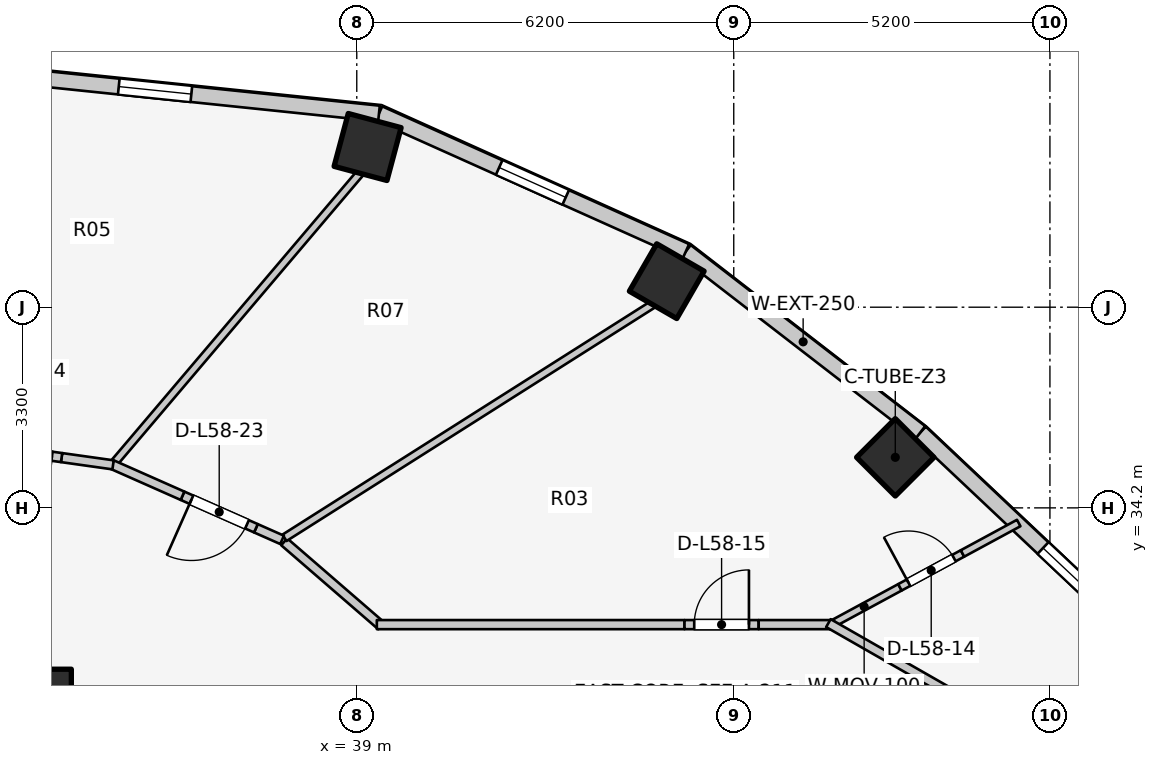
"""IFC4 building model, lengths in metres.
Left out: names, types, materials, properties, quantities, classifications, styles, units other than length and angle.
Written with IfcOpenShell. Run it as: python <this file> out.ifc"""

import sys

from ifc_helpers import new_model, si_unit, direction, frame, frame_2d, origin, origin_2d, place, context, subcontext, project, spatial, rectangle, extrude, element, fill, save


model = new_model("IFC4")
c1 = context("Model", 3, precision=1e-05, world=origin(), true_north=direction((0.0, 1.0)))
c2 = subcontext(c1, "Body", "Model", "MODEL_VIEW")
j1 = project(units=[si_unit("LENGTHUNIT", "METRE"), si_unit("PLANEANGLEUNIT", "RADIAN")], contexts=[c1])
p1 = place(None, origin())
s1 = spatial("IfcSite", under=j1, at=p1, CompositionType="ELEMENT")
p2 = place(p1, origin())
s2 = spatial("IfcBuilding", under=s1, at=p2, CompositionType="ELEMENT")
p3 = place(p2, frame((0.0, 0.0, 190.1)))
s3 = spatial("IfcBuildingStorey", under=s2, at=p3, CompositionType="ELEMENT", Elevation=190.1)
for number, where, z_axis, x_axis in (
    (1, (47.857, 35.031, 0.0), (0.0, 0.0, 1.0), (0.707, 0.707, 0.0)),
    (2, (44.098, 37.928, 0.0), (0.0, 0.0, 1.0), (0.5, 0.866, 0.0)),
):
    element("IfcColumn", number, at=place(p3, frame(where, z_axis=z_axis, x_axis=x_axis)), inside=s3, PredefinedType="COLUMN", context=c2, shape_type="SweptSolid", body=[
        extrude(rectangle(XDim=0.9, YDim=0.9, at=origin_2d()), origin(), (0.0, 0.0, 1.0), 3.1),
    ])
p4 = place(p3, frame((33.931, 31.172, 0.0), z_axis=(0.0, 0.0, 1.0), x_axis=(1.0, 0.0, 0.0)))
e3 = element("IfcColumn", 3, at=p4, inside=s3, PredefinedType="COLUMN", context=c2, shape_type="SweptSolid", body=[
    extrude(rectangle(XDim=0.75, YDim=0.75, at=origin_2d()), origin(), (0.0, 0.0, 1.0), 3.1),
])
p5 = place(p3, frame((39.178, 40.135, 0.0), z_axis=(0.0, 0.0, 1.0), x_axis=(0.258819045103, 0.965925826289, 0.0)))
e4 = element("IfcColumn", 4, at=p5, inside=s3, PredefinedType="COLUMN", context=c2, shape_type="SweptSolid", body=[
    extrude(rectangle(XDim=0.9, YDim=0.9, at=origin_2d()), origin(), (0.0, 0.0, 1.0), 3.1),
])
p6 = place(p3, frame((51.619, 32.284, 0.0), z_axis=(0.0, 0.0, 1.0), x_axis=(-0.727667301037, 0.68593024354, 0.0)))
e5 = element("IfcWall", 5, at=p6, inside=s3, PredefinedType="STANDARD", context=c2, shape_type="SweptSolid", body=[
    extrude(rectangle(XDim=4.604, YDim=0.26, at=frame_2d((2.302, 0.0))), origin(), (0.0, 0.0, 1.0), 1.22),
])
p7 = place(p6, frame((0.631, 0.0, 0.15)))
e6 = element("IfcOpeningElement", 6, at=p7, cuts=e5, PredefinedType="OPENING", context=c2, shape_type="SweptSolid", body=[
    extrude(rectangle(XDim=1.2, YDim=0.9, at=frame_2d((0.6, 0.45))), frame((0.0, 0.14, 0.0), z_axis=(0.0, -1.0, 0.0), x_axis=(1.0, 0.0, 0.0)), (0.0, 0.0, 1.0), 0.28),
])
p8 = place(p3, frame((48.269, 35.441, 0.0), z_axis=(0.0, 0.0, 1.0), x_axis=(-0.791460185804, 0.611220724687, 0.0)))
e7 = element("IfcWall", 7, at=p8, inside=s3, PredefinedType="STANDARD", context=c2, shape_type="SweptSolid", body=[
    extrude(rectangle(XDim=4.872, YDim=0.26, at=frame_2d((2.436, 0.0))), origin(), (0.0, 0.0, 1.0), 1.22),
])
p9 = place(p3, frame((44.413, 38.419, 0.0), z_axis=(0.0, 0.0, 1.0), x_axis=(-0.912353637112, 0.409403029847, 0.0)))
e8 = element("IfcWall", 8, at=p9, inside=s3, PredefinedType="STANDARD", context=c2, shape_type="SweptSolid", body=[
    extrude(rectangle(XDim=5.533, YDim=0.26, at=frame_2d((2.766, 0.0))), origin(), (0.0, 0.0, 1.0), 1.22),
])
p10 = place(p9, frame((2.167, 0.0, 0.15)))
e9 = element("IfcOpeningElement", 9, at=p10, cuts=e8, PredefinedType="OPENING", context=c2, shape_type="SweptSolid", body=[
    extrude(rectangle(XDim=1.2, YDim=0.9, at=frame_2d((0.6, 0.45))), frame((0.0, 0.14, 0.0), z_axis=(0.0, -1.0, 0.0), x_axis=(1.0, 0.0, 0.0)), (0.0, 0.0, 1.0), 0.28),
])
p11 = place(p3, frame((39.365, 40.685, 0.0), z_axis=(0.0, 0.0, 1.0), x_axis=(-0.994664178965, 0.10316574569, 0.0)))
e10 = element("IfcWall", 10, at=p11, inside=s3, PredefinedType="STANDARD", context=c2, shape_type="SweptSolid", body=[
    extrude(rectangle(XDim=7.405, YDim=0.26, at=frame_2d((3.702, 0.0))), origin(), (0.0, 0.0, 1.0), 1.22),
])
p12 = place(p11, frame((3.102, 0.0, 0.15)))
e11 = element("IfcOpeningElement", 11, at=p12, cuts=e10, PredefinedType="OPENING", context=c2, shape_type="SweptSolid", body=[
    extrude(rectangle(XDim=1.2, YDim=0.9, at=frame_2d((0.6, 0.45))), frame((0.0, 0.14, 0.0), z_axis=(0.0, -1.0, 0.0), x_axis=(1.0, 0.0, 0.0)), (0.0, 0.0, 1.0), 0.28),
])
p13 = place(p3, frame((46.756, 32.256, 0.0), z_axis=(0.0, 0.0, 1.0), x_axis=(0.879396983738, 0.476089219572, 0.0)))
e12 = element("IfcWall", 12, at=p13, inside=s3, PredefinedType="MOVABLE", context=c2, shape_type="SweptSolid", body=[
    extrude(rectangle(XDim=1.338, YDim=0.12, at=frame_2d((0.669, 0.0))), origin(), (0.0, 0.0, 1.0), 1.22),
])
p14 = place(p3, frame((47.933, 32.893, 0.0), z_axis=(0.0, 0.0, 1.0), x_axis=(0.879342939039, 0.476189033433, 0.0)))
e13 = element("IfcWall", 13, at=p14, inside=s3, PredefinedType="MOVABLE", context=c2, shape_type="SweptSolid", body=[
    extrude(rectangle(XDim=1.17, YDim=0.12, at=frame_2d((0.585, 0.0))), origin(), (0.0, 0.0, 1.0), 2.11),
])
p15 = place(p14, frame((0.16, 0.0, 0.0)))
e14 = element("IfcOpeningElement", 14, at=p15, cuts=e13, PredefinedType="OPENING", context=c2, shape_type="SweptSolid", body=[
    extrude(rectangle(XDim=0.85, YDim=2.05, at=frame_2d((0.425, 1.025))), frame((0.0, 0.07, 0.0), z_axis=(0.0, -1.0, 0.0), x_axis=(1.0, 0.0, 0.0)), (0.0, 0.0, 1.0), 0.14),
])
p16 = place(p3, frame((48.962, 33.45, 0.0), z_axis=(0.0, 0.0, 1.0), x_axis=(0.879417553007, 0.476051223571, 0.0)))
e15 = element("IfcWall", 15, at=p16, inside=s3, PredefinedType="MOVABLE", context=c2, shape_type="SweptSolid", body=[
    extrude(rectangle(XDim=1.051, YDim=0.12, at=frame_2d((0.526, 0.0))), origin(), (0.0, 0.0, 1.0), 2.575),
])
p17 = place(p3, frame((37.807, 33.642, 0.0), z_axis=(0.0, 0.0, 1.0), x_axis=(0.756055312247, -0.654507727092, 0.0)))
e16 = element("IfcWall", 16, at=p17, inside=s3, PredefinedType="PARTITIONING", context=c2, shape_type="SweptSolid", body=[
    extrude(rectangle(XDim=2.111, YDim=0.15, at=frame_2d((1.055, 0.0))), origin(), (0.0, 0.0, 1.0), 1.22),
])
p18 = place(p3, frame((39.33, 32.28, 0.0), z_axis=(0.0, 0.0, 1.0), x_axis=(1.0, 0.0, 0.0)))
e17 = element("IfcWall", 17, at=p18, inside=s3, PredefinedType="PARTITIONING", context=c2, shape_type="SweptSolid", body=[
    extrude(rectangle(XDim=5.06, YDim=0.15, at=frame_2d((2.53, 0.0))), origin(), (0.0, 0.0, 1.0), 1.22),
])
p19 = place(p3, frame((44.39, 32.28, 0.0), z_axis=(0.0, 0.0, 1.0), x_axis=(1.0, 0.0, 0.0)))
e18 = element("IfcWall", 18, at=p19, inside=s3, PredefinedType="PARTITIONING", context=c2, shape_type="SweptSolid", body=[
    extrude(rectangle(XDim=1.22, YDim=0.15, at=frame_2d((0.61, 0.0))), origin(), (0.0, 0.0, 1.0), 2.16),
])
p20 = place(p19, frame((0.16, 0.0, 0.0)))
e19 = element("IfcOpeningElement", 19, at=p20, cuts=e18, PredefinedType="OPENING", context=c2, shape_type="SweptSolid", body=[
    extrude(rectangle(XDim=0.9, YDim=2.1, at=frame_2d((0.45, 1.05))), frame((0.0, 0.085, 0.0), z_axis=(0.0, -1.0, 0.0), x_axis=(1.0, 0.0, 0.0)), (0.0, 0.0, 1.0), 0.17),
])
p21 = place(p3, frame((45.61, 32.28, 0.0), z_axis=(0.0, 0.0, 1.0), x_axis=(1.0, 0.0, 0.0)))
e20 = element("IfcWall", 20, at=p21, inside=s3, PredefinedType="PARTITIONING", context=c2, shape_type="SweptSolid", body=[
    extrude(rectangle(XDim=1.24, YDim=0.15, at=frame_2d((0.62, 0.0))), origin(), (0.0, 0.0, 1.0), 2.575),
])
p22 = place(p3, frame((46.757, 32.305, 0.0), z_axis=(0.0, 0.0, 1.0), x_axis=(0.867991349648, -0.496579315857, 0.0)))
e21 = element("IfcWall", 21, at=p22, inside=s3, PredefinedType="PARTITIONING", context=c2, shape_type="SweptSolid", body=[
    extrude(rectangle(XDim=2.567, YDim=0.15, at=frame_2d((1.283, 0.0))), origin(), (0.0, 0.0, 1.0), 1.22),
])
p23 = place(p3, frame((37.812, 33.708, 0.0), z_axis=(0.0, 0.0, 1.0), x_axis=(0.844640430122, 0.535334048799, 0.0)))
e22 = element("IfcWall", 22, at=p23, inside=s3, PredefinedType="PARTITIONING", context=c2, shape_type="SweptSolid", body=[
    extrude(rectangle(XDim=7.188, YDim=0.125, at=frame_2d((3.594, 0.0))), origin(), (0.0, 0.0, 1.0), 1.22),
])
p24 = place(p3, frame((35.02, 34.952, 0.0), z_axis=(0.0, 0.0, 1.0), x_axis=(0.647173462792, 0.762342776615, 0.0)))
e23 = element("IfcWall", 23, at=p24, inside=s3, PredefinedType="PARTITIONING", context=c2, shape_type="SweptSolid", body=[
    extrude(rectangle(XDim=6.253, YDim=0.125, at=frame_2d((3.127, 0.0))), origin(), (0.0, 0.0, 1.0), 1.22),
])
p25 = place(p3, frame((37.772, 33.674, 0.0), z_axis=(0.0, 0.0, 1.0), x_axis=(-0.914387769504, 0.404839482983, 0.0)))
e24 = element("IfcWall", 24, at=p25, inside=s3, PredefinedType="PARTITIONING", context=c2, shape_type="SweptSolid", body=[
    extrude(rectangle(XDim=0.471, YDim=0.15, at=frame_2d((0.235, 0.0))), origin(), (0.0, 0.0, 1.0), 2.575),
])
p26 = place(p3, frame((37.341, 33.865, 0.0), z_axis=(0.0, 0.0, 1.0), x_axis=(-0.914314172667, 0.405005671145, 0.0)))
e25 = element("IfcWall", 25, at=p26, inside=s3, PredefinedType="PARTITIONING", context=c2, shape_type="SweptSolid", body=[
    extrude(rectangle(XDim=1.32, YDim=0.15, at=frame_2d((0.66, 0.0))), origin(), (0.0, 0.0, 1.0), 2.16),
])
p27 = place(p26, frame((0.16, 0.0, 0.0)))
e26 = element("IfcOpeningElement", 26, at=p27, cuts=e25, PredefinedType="OPENING", context=c2, shape_type="SweptSolid", body=[
    extrude(rectangle(XDim=1.0, YDim=2.1, at=frame_2d((0.5, 1.05))), frame((0.0, 0.085, 0.0), z_axis=(0.0, -1.0, 0.0), x_axis=(1.0, 0.0, 0.0)), (0.0, 0.0, 1.0), 0.17),
])
p28 = place(p3, frame((36.134, 34.399, 0.0), z_axis=(0.0, 0.0, 1.0), x_axis=(-0.914311660367, 0.405011342701, 0.0)))
e27 = element("IfcWall", 27, at=p28, inside=s3, PredefinedType="PARTITIONING", context=c2, shape_type="SweptSolid", body=[
    extrude(rectangle(XDim=1.267, YDim=0.15, at=frame_2d((0.633, 0.0))), origin(), (0.0, 0.0, 1.0), 1.22),
])
p29 = place(p3, frame((34.992, 34.908, 0.0), z_axis=(0.0, 0.0, 1.0), x_axis=(-0.990238723834, 0.139381741342, 0.0)))
e28 = element("IfcWall", 28, at=p29, inside=s3, PredefinedType="PARTITIONING", context=c2, shape_type="SweptSolid", body=[
    extrude(rectangle(XDim=0.855, YDim=0.15, at=frame_2d((0.427, 0.0))), origin(), (0.0, 0.0, 1.0), 2.575),
])
p30 = place(p3, frame((34.146, 35.027, 0.0), z_axis=(0.0, 0.0, 1.0), x_axis=(-0.990254187593, 0.139271834751, 0.0)))
e29 = element("IfcWall", 29, at=p30, inside=s3, PredefinedType="PARTITIONING", context=c2, shape_type="SweptSolid", body=[
    extrude(rectangle(XDim=1.32, YDim=0.15, at=frame_2d((0.66, 0.0))), origin(), (0.0, 0.0, 1.0), 2.575),
])
p31 = place(p30, frame((0.16, 0.0, 0.0)))
e30 = element("IfcOpeningElement", 30, at=p31, cuts=e29, PredefinedType="OPENING", context=c2, shape_type="SweptSolid", body=[
    extrude(rectangle(XDim=1.0, YDim=2.1, at=frame_2d((0.5, 1.05))), frame((0.0, 0.085, 0.0), z_axis=(0.0, -1.0, 0.0), x_axis=(1.0, 0.0, 0.0)), (0.0, 0.0, 1.0), 0.17),
])
p32 = place(p7, origin())
e31 = element("IfcWindow", 31, at=p32, inside=s3, PartitioningType="SINGLE_PANEL", PredefinedType="WINDOW", context=c2, shape_type="SweptSolid", body=[
    extrude(rectangle(XDim=1.2, YDim=0.9, at=frame_2d((0.6, 0.45))), frame((0.0, 0.03, 0.0), z_axis=(0.0, -1.0, 0.0), x_axis=(1.0, 0.0, 0.0)), (0.0, 0.0, 1.0), 0.06),
])
fill(e6, e31)
p33 = place(p10, origin())
e32 = element("IfcWindow", 32, at=p33, inside=s3, PartitioningType="SINGLE_PANEL", PredefinedType="WINDOW", context=c2, shape_type="SweptSolid", body=[
    extrude(rectangle(XDim=1.2, YDim=0.9, at=frame_2d((0.6, 0.45))), frame((0.0, 0.03, 0.0), z_axis=(0.0, -1.0, 0.0), x_axis=(1.0, 0.0, 0.0)), (0.0, 0.0, 1.0), 0.06),
])
fill(e9, e32)
p34 = place(p12, origin())
e33 = element("IfcWindow", 33, at=p34, inside=s3, PartitioningType="SINGLE_PANEL", PredefinedType="WINDOW", context=c2, shape_type="SweptSolid", body=[
    extrude(rectangle(XDim=1.2, YDim=0.9, at=frame_2d((0.6, 0.45))), frame((0.0, 0.03, 0.0), z_axis=(0.0, -1.0, 0.0), x_axis=(1.0, 0.0, 0.0)), (0.0, 0.0, 1.0), 0.06),
])
fill(e11, e33)
p35 = place(p15, origin())
e34 = element("IfcDoor", 34, at=p35, inside=s3, OperationType="SINGLE_SWING_LEFT", PredefinedType="DOOR", context=c2, shape_type="SweptSolid", body=[
    extrude(rectangle(XDim=0.85, YDim=2.05, at=frame_2d((0.425, 1.025))), frame((0.0, 0.025, 0.0), z_axis=(0.0, -1.0, 0.0), x_axis=(1.0, 0.0, 0.0)), (0.0, 0.0, 1.0), 0.05),
])
fill(e14, e34)
p36 = place(p20, origin())
e35 = element("IfcDoor", 35, at=p36, inside=s3, OperationType="SINGLE_SWING_RIGHT", PredefinedType="DOOR", context=c2, shape_type="SweptSolid", body=[
    extrude(rectangle(XDim=0.9, YDim=2.1, at=frame_2d((0.45, 1.05))), frame((0.0, 0.025, 0.0), z_axis=(0.0, -1.0, 0.0), x_axis=(1.0, 0.0, 0.0)), (0.0, 0.0, 1.0), 0.05),
])
fill(e19, e35)
p37 = place(p27, origin())
e36 = element("IfcDoor", 36, at=p37, inside=s3, OperationType="SINGLE_SWING_RIGHT", PredefinedType="DOOR", context=c2, shape_type="SweptSolid", body=[
    extrude(rectangle(XDim=1.0, YDim=2.1, at=frame_2d((0.5, 1.05))), frame((0.0, 0.025, 0.0), z_axis=(0.0, -1.0, 0.0), x_axis=(1.0, 0.0, 0.0)), (0.0, 0.0, 1.0), 0.05),
])
fill(e26, e36)
p38 = place(p31, origin())
e37 = element("IfcDoor", 37, at=p38, inside=s3, OperationType="SINGLE_SWING_LEFT", PredefinedType="DOOR", context=c2, shape_type="SweptSolid", body=[
    extrude(rectangle(XDim=1.0, YDim=2.1, at=frame_2d((0.5, 1.05))), frame((0.0, 0.025, 0.0), z_axis=(0.0, -1.0, 0.0), x_axis=(1.0, 0.0, 0.0)), (0.0, 0.0, 1.0), 0.05),
])
fill(e30, e37)
save(model, sys.argv[1])
